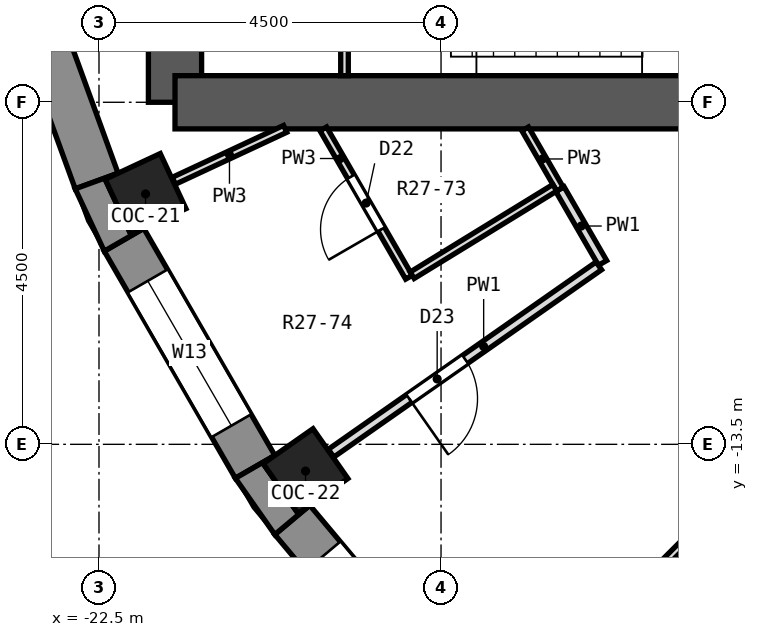
"""IFC4 building model, lengths in metres.
Left out: names, types, materials, properties, quantities, classifications, styles, units other than length and angle.
Written with IfcOpenShell. Run it as: python <this file> out.ifc"""

import sys

from ifc_helpers import new_model, si_unit, direction, frame, frame_2d, origin, origin_2d, place, context, subcontext, project, spatial, polyline, rectangle, outline, extrude, element, fill, save


model = new_model("IFC4")
c1 = context("Model", 3, precision=1e-05, world=origin(), true_north=direction((0.0, 1.0)))
c2 = subcontext(c1, "Body", "Model", "MODEL_VIEW")
j1 = project(units=[si_unit("LENGTHUNIT", "METRE"), si_unit("PLANEANGLEUNIT", "RADIAN")], contexts=[c1])
p1 = place(None, origin())
s1 = spatial("IfcSite", under=j1, at=p1, CompositionType="ELEMENT")
p2 = place(p1, origin())
s2 = spatial("IfcBuilding", under=s1, at=p2, CompositionType="ELEMENT")
p3 = place(p2, frame((0.0, 0.0, 180.6)))
s3 = spatial("IfcBuildingStorey", under=s2, at=p3, CompositionType="ELEMENT", Elevation=180.6)
for number, where, z_axis, x_axis in (
    (1, (-21.887, -10.206, 0.0), (0.0, 0.0, 1.0), (-0.906, -0.423, 0.0)),
    (2, (-19.782, -13.852, 0.0), (0.0, 0.0, 1.0), (-0.819, -0.574, 0.0)),
):
    element("IfcColumn", number, at=place(p3, frame(where, z_axis=z_axis, x_axis=x_axis)), inside=s3, PredefinedType="COLUMN", context=c2, shape_type="SweptSolid", body=[
        extrude(rectangle(XDim=0.8, YDim=0.8, at=origin_2d()), origin(), (0.0, 0.0, 1.0), 3.3),
    ])
p4 = place(p3, frame((-21.5, -9.0, 0.0), z_axis=(0.0, 0.0, 1.0), x_axis=(0.0, 1.0, 0.0)))
e3 = element("IfcWall", 3, at=p4, inside=s3, PredefinedType="SHEAR", context=c2, shape_type="SweptSolid", body=[
    extrude(rectangle(XDim=18.0, YDim=0.7, at=frame_2d((9.0, 0.0))), origin(), (0.0, 0.0, 1.0), 3.3),
])
p5 = place(p4, frame((9.45, 0.0, 0.0)))
e4 = element("IfcOpeningElement", 4, at=p5, cuts=e3, PredefinedType="OPENING", context=c2, shape_type="SweptSolid", body=[
    extrude(rectangle(XDim=0.9, YDim=2.1, at=frame_2d((0.45, 1.05))), frame((0.0, 0.362, 0.0), z_axis=(0.0, -1.0, 0.0), x_axis=(1.0, 0.0, 0.0)), (0.0, 0.0, 1.0), 0.724),
])
p6 = place(p4, frame((7.65, 0.0, 0.0)))
e5 = element("IfcOpeningElement", 5, at=p6, cuts=e3, PredefinedType="OPENING", context=c2, shape_type="SweptSolid", body=[
    extrude(rectangle(XDim=0.9, YDim=2.1, at=frame_2d((0.45, 1.05))), frame((0.0, 0.362, 0.0), z_axis=(0.0, -1.0, 0.0), x_axis=(1.0, 0.0, 0.0)), (0.0, 0.0, 1.0), 0.724),
])
p7 = place(p3, frame((-13.5, -9.0, 0.0), z_axis=(0.0, 0.0, 1.0), x_axis=(-1.0, 0.0, 0.0)))
e6 = element("IfcWall", 6, at=p7, inside=s3, PredefinedType="SHEAR", context=c2, shape_type="SweptSolid", body=[
    extrude(rectangle(XDim=8.0, YDim=0.7, at=frame_2d((4.0, 0.0))), origin(), (0.0, 0.0, 1.0), 3.3),
])
p8 = place(p3, frame((-23.711, -6.794, 0.0), z_axis=(0.0, 0.0, 1.0), x_axis=(0.342032843455, -0.93968799822, 0.0)))
e7 = element("IfcWall", 7, at=p8, inside=s3, PredefinedType="SOLIDWALL", context=c2, shape_type="SweptSolid", body=[
    extrude(rectangle(XDim=3.45, YDim=0.6, at=frame_2d((1.725, 0.0))), origin(), (0.0, 0.0, 1.0), 2.85),
])
p9 = place(p3, frame((-22.171, -10.809, 0.0), z_axis=(0.0, 0.0, 1.0), x_axis=(0.499998129301, -0.86602648383, 0.0)))
e8 = element("IfcWall", 8, at=p9, inside=s3, PredefinedType="SOLIDWALL", context=c2, shape_type="SweptSolid", body=[
    extrude(rectangle(XDim=3.45, YDim=0.6, at=frame_2d((1.725, 0.0))), origin(), (0.0, 0.0, 1.0), 2.85),
])
p10 = place(p9, frame((0.625, 0.0, 0.9)))
e9 = element("IfcOpeningElement", 9, at=p10, cuts=e8, PredefinedType="OPENING", context=c2, shape_type="SweptSolid", body=[
    extrude(rectangle(XDim=2.2, YDim=1.8, at=frame_2d((1.1, 0.9))), frame((0.0, 0.312, 0.0), z_axis=(0.0, -1.0, 0.0), x_axis=(1.0, 0.0, 0.0)), (0.0, 0.0, 1.0), 0.624),
])
p11 = place(p3, frame((-19.957, -14.494, 0.0), z_axis=(0.0, 0.0, 1.0), x_axis=(0.642770398358, -0.766058884809, 0.0)))
e10 = element("IfcWall", 10, at=p11, inside=s3, PredefinedType="SOLIDWALL", context=c2, shape_type="SweptSolid", body=[
    extrude(rectangle(XDim=3.449, YDim=0.6, at=frame_2d((1.725, 0.0))), origin(), (0.0, 0.0, 1.0), 2.85),
])
p12 = place(p11, frame((0.625, 0.0, 0.9)))
e11 = element("IfcOpeningElement", 11, at=p12, cuts=e10, PredefinedType="OPENING", context=c2, shape_type="SweptSolid", body=[
    extrude(rectangle(XDim=2.2, YDim=1.8, at=frame_2d((1.1, 0.9))), frame((0.0, 0.312, 0.0), z_axis=(0.0, -1.0, 0.0), x_axis=(1.0, 0.0, 0.0)), (0.0, 0.0, 1.0), 0.624),
])
p13 = place(p3, origin())
e12 = element("IfcWall", 12, at=p13, inside=s3, PredefinedType="SOLIDWALL", context=c2, shape_type="SweptSolid", body=[
    extrude(outline(polyline([(-22.431, -10.959), (-21.911, -10.659), (-22.081, -10.738), (-22.419, -10.013), (-22.249, -9.934), (-22.813, -10.139), (-22.431, -10.959)])), origin(), (0.0, 0.0, 1.0), 2.85),
])
p14 = place(p3, origin())
e13 = element("IfcWall", 13, at=p14, inside=s3, PredefinedType="SOLIDWALL", context=c2, shape_type="SweptSolid", body=[
    extrude(outline(polyline([(-20.706, -13.946), (-20.187, -14.687), (-19.727, -14.302), (-19.881, -14.409), (-20.34, -13.754), (-20.186, -13.646), (-20.706, -13.946)])), origin(), (0.0, 0.0, 1.0), 2.85),
])
p15 = place(p3, frame((-19.549, -9.35, 0.0), z_axis=(0.0, 0.0, 1.0), x_axis=(0.500006872736, -0.866021435772, 0.0)))
e14 = element("IfcWall", 14, at=p15, inside=s3, PredefinedType="PARTITIONING", context=c2, shape_type="SweptSolid", body=[
    extrude(rectangle(XDim=2.254, YDim=0.1, at=frame_2d((1.127, 0.0))), origin(), (0.0, 0.0, 1.0), 2.85),
])
p16 = place(p15, frame((0.727, 0.0, 0.0)))
e15 = element("IfcOpeningElement", 15, at=p16, cuts=e14, PredefinedType="OPENING", context=c2, shape_type="SweptSolid", body=[
    extrude(rectangle(XDim=0.8, YDim=2.1, at=frame_2d((0.4, 1.05))), frame((0.0, 0.062, 0.0), z_axis=(0.0, -1.0, 0.0), x_axis=(1.0, 0.0, 0.0)), (0.0, 0.0, 1.0), 0.124),
])
p17 = place(p3, frame((-16.436, -10.142, 0.0), z_axis=(0.0, 0.0, 1.0), x_axis=(0.500306615371, -0.865848306932, 0.0)))
e16 = element("IfcWall", 16, at=p17, inside=s3, PredefinedType="PARTITIONING", context=c2, shape_type="SweptSolid", body=[
    extrude(rectangle(XDim=1.121, YDim=0.125, at=frame_2d((0.561, 0.0))), origin(), (0.0, 0.0, 1.0), 2.85),
])
p18 = place(p3, frame((-16.893, -9.35, 0.0), z_axis=(0.0, 0.0, 1.0), x_axis=(0.499699344759, -0.866198917598, 0.0)))
e17 = element("IfcWall", 17, at=p18, inside=s3, PredefinedType="PARTITIONING", context=c2, shape_type="SweptSolid", body=[
    extrude(rectangle(XDim=0.915, YDim=0.1, at=frame_2d((0.457, 0.0))), origin(), (0.0, 0.0, 1.0), 2.85),
])
p19 = place(p3, frame((-21.516, -10.033, 0.0), z_axis=(0.0, 0.0, 1.0), x_axis=(0.906329754533, 0.422571149096, 0.0)))
e18 = element("IfcWall", 18, at=p19, inside=s3, PredefinedType="PARTITIONING", context=c2, shape_type="SweptSolid", body=[
    extrude(rectangle(XDim=1.616, YDim=0.1, at=frame_2d((0.808, 0.0))), origin(), (0.0, 0.0, 1.0), 2.85),
])
p20 = place(p3, frame((-18.379, -11.276, 0.0), z_axis=(0.0, 0.0, 1.0), x_axis=(0.852400277597, 0.522889822766, 0.0)))
e19 = element("IfcWall", 19, at=p20, inside=s3, PredefinedType="PARTITIONING", context=c2, shape_type="SweptSolid", body=[
    extrude(rectangle(XDim=2.2, YDim=0.1, at=frame_2d((1.1, 0.0))), origin(), (0.0, 0.0, 1.0), 2.85),
])
p21 = place(p3, frame((-19.447, -13.616, 0.0), z_axis=(0.0, 0.0, 1.0), x_axis=(0.819407978004, 0.573210751455, 0.0)))
e20 = element("IfcWall", 20, at=p21, inside=s3, PredefinedType="PARTITIONING", context=c2, shape_type="SweptSolid", body=[
    extrude(rectangle(XDim=4.299, YDim=0.125, at=frame_2d((2.149, 0.0))), origin(), (0.0, 0.0, 1.0), 2.85),
])
p22 = place(p21, frame((1.253, 0.0, 0.0)))
e21 = element("IfcOpeningElement", 21, at=p22, cuts=e20, PredefinedType="OPENING", context=c2, shape_type="SweptSolid", body=[
    extrude(rectangle(XDim=0.9, YDim=2.1, at=frame_2d((0.45, 1.05))), frame((0.0, 0.074, 0.0), z_axis=(0.0, -1.0, 0.0), x_axis=(1.0, 0.0, 0.0)), (0.0, 0.0, 1.0), 0.149),
])
p23 = place(p3, frame((-15.37, -15.37, 0.0), z_axis=(0.0, 0.0, 1.0), x_axis=(0.707106781187, 0.707106781187, 0.0)))
e22 = element("IfcWall", 22, at=p23, inside=s3, PredefinedType="PARTITIONING", context=c2, shape_type="SweptSolid", body=[
    extrude(rectangle(XDim=2.307, YDim=0.1, at=frame_2d((1.153, 0.0))), origin(), (0.0, 0.0, 1.0), 2.85),
])
p24 = place(p3, frame((-19.27, -8.65, 0.0), z_axis=(0.0, 0.0, 1.0), x_axis=(0.0, 1.0, 0.0)))
e23 = element("IfcWall", 23, at=p24, inside=s3, PredefinedType="PARTITIONING", context=c2, shape_type="SweptSolid", body=[
    extrude(rectangle(XDim=3.45, YDim=0.1, at=frame_2d((1.725, 0.0))), origin(), (0.0, 0.0, 1.0), 2.85),
])
p25 = place(p10, origin())
e24 = element("IfcWindow", 24, at=p25, inside=s3, PartitioningType="SINGLE_PANEL", PredefinedType="WINDOW", context=c2, shape_type="SweptSolid", body=[
    extrude(rectangle(XDim=2.2, YDim=1.8, at=frame_2d((1.1, 0.9))), frame((0.0, 0.18, 0.0), z_axis=(0.0, -1.0, 0.0), x_axis=(1.0, 0.0, 0.0)), (0.0, 0.0, 1.0), 0.06),
])
fill(e9, e24)
p26 = place(p12, origin())
e25 = element("IfcWindow", 25, at=p26, inside=s3, PartitioningType="SINGLE_PANEL", PredefinedType="WINDOW", context=c2, shape_type="SweptSolid", body=[
    extrude(rectangle(XDim=2.2, YDim=1.8, at=frame_2d((1.1, 0.9))), frame((0.0, 0.18, 0.0), z_axis=(0.0, -1.0, 0.0), x_axis=(1.0, 0.0, 0.0)), (0.0, 0.0, 1.0), 0.06),
])
fill(e11, e25)
p27 = place(p16, frame((0.8, 0.0, 0.0), z_axis=(0.0, 0.0, 1.0), x_axis=(-1.0, 0.0, 0.0)))
e26 = element("IfcDoor", 26, at=p27, inside=s3, OperationType="SINGLE_SWING_LEFT", PredefinedType="DOOR", context=c2, shape_type="SweptSolid", body=[
    extrude(rectangle(XDim=0.8, YDim=2.1, at=frame_2d((0.4, 1.05))), frame((0.0, 0.025, 0.0), z_axis=(0.0, -1.0, 0.0), x_axis=(1.0, 0.0, 0.0)), (0.0, 0.0, 1.0), 0.05),
])
fill(e15, e26)
p28 = place(p22, frame((0.9, 0.0, 0.0), z_axis=(0.0, 0.0, 1.0), x_axis=(-1.0, 0.0, 0.0)))
e27 = element("IfcDoor", 27, at=p28, inside=s3, OperationType="SINGLE_SWING_RIGHT", PredefinedType="DOOR", context=c2, shape_type="SweptSolid", body=[
    extrude(rectangle(XDim=0.9, YDim=2.1, at=frame_2d((0.45, 1.05))), frame((0.0, 0.025, 0.0), z_axis=(0.0, -1.0, 0.0), x_axis=(1.0, 0.0, 0.0)), (0.0, 0.0, 1.0), 0.05),
])
fill(e21, e27)
save(model, sys.argv[1])
